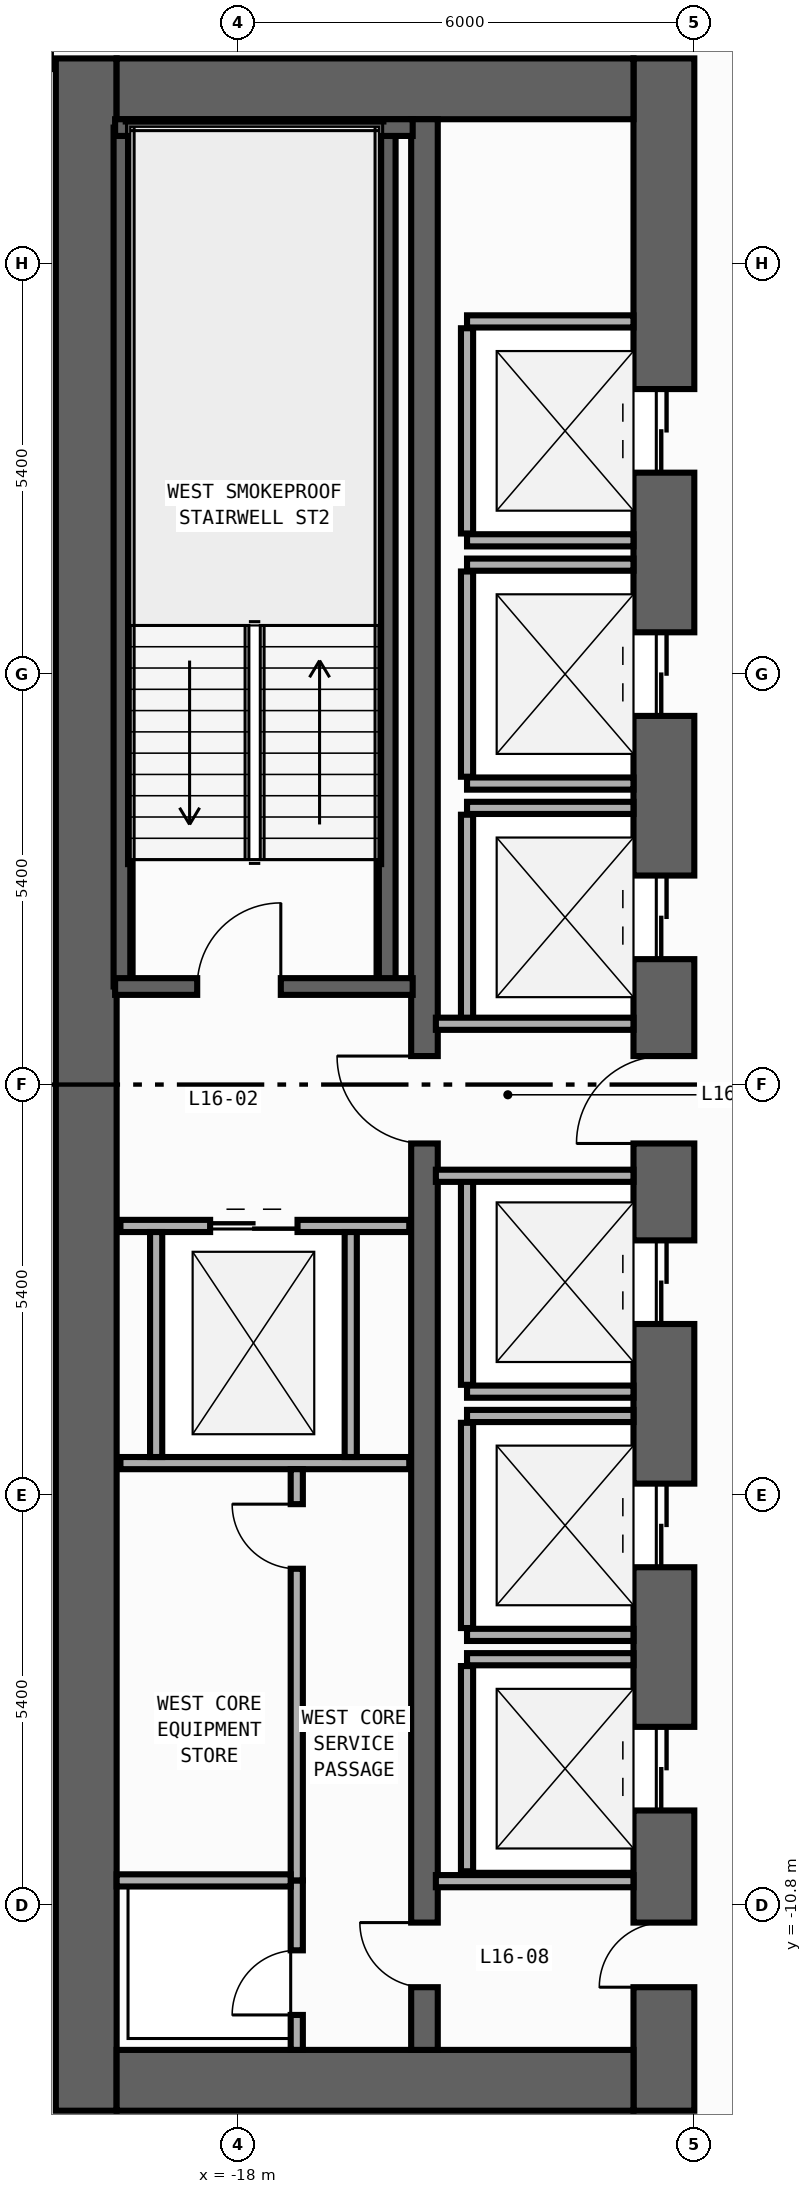
"""IFC4 building model, lengths in metres.
Left out: names, types, materials, properties, quantities, classifications, styles, units other than length and angle.
Written with IfcOpenShell. Run it as: python <this file> out.ifc"""

import sys

from ifc_helpers import new_model, si_unit, direction, frame, frame_2d, origin, place, context, subcontext, project, spatial, rectangle, extrude, element, fill, save


model = new_model("IFC4")
c1 = context("Model", 3, precision=1e-05, world=origin(), true_north=direction((0.0, 1.0)))
c2 = subcontext(c1, "Body", "Model", "MODEL_VIEW")
j1 = project(units=[si_unit("LENGTHUNIT", "METRE"), si_unit("PLANEANGLEUNIT", "RADIAN")], contexts=[c1])
p1 = place(None, origin())
s1 = spatial("IfcSite", under=j1, at=p1, CompositionType="ELEMENT")
p2 = place(p1, origin())
s2 = spatial("IfcBuilding", under=s1, at=p2, CompositionType="ELEMENT")
p3 = place(p2, frame((0.0, 0.0, 68.0)))
s3 = spatial("IfcBuildingStorey", under=s2, at=p3, CompositionType="ELEMENT", Elevation=68.0)
p4 = place(p3, frame((-20.0, -13.5, 0.0), z_axis=(0.0, 0.0, 1.0), x_axis=(0.0, 1.0, 0.0)))
e1 = element("IfcWall", 1, at=p4, inside=s3, PredefinedType="SHEAR", context=c2, shape_type="SweptSolid", body=[
    extrude(rectangle(XDim=27.0, YDim=0.8, at=frame_2d((13.5, 0.0))), origin(), (0.0, 0.0, 1.0), 3.94),
])
p5 = place(p3, frame((-12.4, -13.5, 0.0), z_axis=(0.0, 0.0, 1.0), x_axis=(0.0, 1.0, 0.0)))
e2 = element("IfcWall", 2, at=p5, inside=s3, PredefinedType="SHEAR", context=c2, shape_type="SweptSolid", body=[
    extrude(rectangle(XDim=27.0, YDim=0.8, at=frame_2d((13.5, 0.0))), origin(), (0.0, 0.0, 1.0), 3.94),
])
p6 = place(p5, frame((21.55, 0.0, 0.0)))
e3 = element("IfcOpeningElement", 3, at=p6, cuts=e2, PredefinedType="OPENING", context=c2, shape_type="SweptSolid", body=[
    extrude(rectangle(XDim=1.1, YDim=2.2, at=frame_2d((0.55, 1.1))), frame((0.0, 0.41, 0.0), z_axis=(0.0, -1.0, 0.0), x_axis=(1.0, 0.0, 0.0)), (0.0, 0.0, 1.0), 0.82),
])
p7 = place(p5, frame((18.35, 0.0, 0.0)))
e4 = element("IfcOpeningElement", 4, at=p7, cuts=e2, PredefinedType="OPENING", context=c2, shape_type="SweptSolid", body=[
    extrude(rectangle(XDim=1.1, YDim=2.2, at=frame_2d((0.55, 1.1))), frame((0.0, 0.41, 0.0), z_axis=(0.0, -1.0, 0.0), x_axis=(1.0, 0.0, 0.0)), (0.0, 0.0, 1.0), 0.82),
])
p8 = place(p5, frame((15.15, 0.0, 0.0)))
e5 = element("IfcOpeningElement", 5, at=p8, cuts=e2, PredefinedType="OPENING", context=c2, shape_type="SweptSolid", body=[
    extrude(rectangle(XDim=1.1, YDim=2.2, at=frame_2d((0.55, 1.1))), frame((0.0, 0.41, 0.0), z_axis=(0.0, -1.0, 0.0), x_axis=(1.0, 0.0, 0.0)), (0.0, 0.0, 1.0), 0.82),
])
p9 = place(p5, frame((10.35, 0.0, 0.0)))
e6 = element("IfcOpeningElement", 6, at=p9, cuts=e2, PredefinedType="OPENING", context=c2, shape_type="SweptSolid", body=[
    extrude(rectangle(XDim=1.1, YDim=2.2, at=frame_2d((0.55, 1.1))), frame((0.0, 0.41, 0.0), z_axis=(0.0, -1.0, 0.0), x_axis=(1.0, 0.0, 0.0)), (0.0, 0.0, 1.0), 0.82),
])
p10 = place(p5, frame((7.15, 0.0, 0.0)))
e7 = element("IfcOpeningElement", 7, at=p10, cuts=e2, PredefinedType="OPENING", context=c2, shape_type="SweptSolid", body=[
    extrude(rectangle(XDim=1.1, YDim=2.2, at=frame_2d((0.55, 1.1))), frame((0.0, 0.41, 0.0), z_axis=(0.0, -1.0, 0.0), x_axis=(1.0, 0.0, 0.0)), (0.0, 0.0, 1.0), 0.82),
])
p11 = place(p5, frame((3.95, 0.0, 0.0)))
e8 = element("IfcOpeningElement", 8, at=p11, cuts=e2, PredefinedType="OPENING", context=c2, shape_type="SweptSolid", body=[
    extrude(rectangle(XDim=1.1, YDim=2.2, at=frame_2d((0.55, 1.1))), frame((0.0, 0.41, 0.0), z_axis=(0.0, -1.0, 0.0), x_axis=(1.0, 0.0, 0.0)), (0.0, 0.0, 1.0), 0.82),
])
p12 = place(p5, frame((12.725, 0.0, 0.0)))
e9 = element("IfcOpeningElement", 9, at=p12, cuts=e2, PredefinedType="OPENING", context=c2, shape_type="SweptSolid", body=[
    extrude(rectangle(XDim=1.15, YDim=2.2, at=frame_2d((0.575, 1.1))), frame((0.0, 0.41, 0.0), z_axis=(0.0, -1.0, 0.0), x_axis=(1.0, 0.0, 0.0)), (0.0, 0.0, 1.0), 0.82),
])
p13 = place(p5, frame((1.625, 0.0, 0.0)))
e10 = element("IfcOpeningElement", 10, at=p13, cuts=e2, PredefinedType="OPENING", context=c2, shape_type="SweptSolid", body=[
    extrude(rectangle(XDim=0.85, YDim=2.1, at=frame_2d((0.425, 1.05))), frame((0.0, 0.41, 0.0), z_axis=(0.0, -1.0, 0.0), x_axis=(1.0, 0.0, 0.0)), (0.0, 0.0, 1.0), 0.82),
])
for number, where, z_axis, x_axis in (
    (11, (-19.6, -13.1, 0.0), (0.0, 0.0, 1.0), (1.0, 0.0, 0.0)),
    (12, (-19.6, 13.1, 0.0), (0.0, 0.0, 1.0), (1.0, 0.0, 0.0)),
):
    element("IfcWall", number, at=place(p3, frame(where, z_axis=z_axis, x_axis=x_axis)), inside=s3, PredefinedType="SHEAR", context=c2, shape_type="SweptSolid", body=[
        extrude(rectangle(XDim=6.8, YDim=0.8, at=frame_2d((3.4, 0.0))), origin(), (0.0, 0.0, 1.0), 3.94),
    ])
p14 = place(p3, frame((-15.55, -12.7, 0.0), z_axis=(0.0, 0.0, 1.0), x_axis=(0.0, 1.0, 0.0)))
e13 = element("IfcWall", 13, at=p14, inside=s3, PredefinedType="SHEAR", context=c2, shape_type="SweptSolid", body=[
    extrude(rectangle(XDim=25.4, YDim=0.35, at=frame_2d((12.7, 0.0))), origin(), (0.0, 0.0, 1.0), 3.94),
])
p15 = place(p14, frame((11.925, 0.0, 0.0)))
e14 = element("IfcOpeningElement", 14, at=p15, cuts=e13, PredefinedType="OPENING", context=c2, shape_type="SweptSolid", body=[
    extrude(rectangle(XDim=1.15, YDim=2.2, at=frame_2d((0.575, 1.1))), frame((0.0, 0.185, 0.0), z_axis=(0.0, -1.0, 0.0), x_axis=(1.0, 0.0, 0.0)), (0.0, 0.0, 1.0), 0.37),
])
p16 = place(p14, frame((0.825, 0.0, 0.0)))
e15 = element("IfcOpeningElement", 15, at=p16, cuts=e13, PredefinedType="OPENING", context=c2, shape_type="SweptSolid", body=[
    extrude(rectangle(XDim=0.85, YDim=2.1, at=frame_2d((0.425, 1.05))), frame((0.0, 0.185, 0.0), z_axis=(0.0, -1.0, 0.0), x_axis=(1.0, 0.0, 0.0)), (0.0, 0.0, 1.0), 0.37),
])
for number, where, z_axis, x_axis in (
    (16, (-16.04, 1.29, 0.0), (0.0, 0.0, 1.0), (0.0, 1.0, 0.0)),
    (17, (-19.53, 1.29, 0.0), (0.0, 0.0, 1.0), (0.0, 1.0, 0.0)),
):
    element("IfcWall", number, at=place(p3, frame(where, z_axis=z_axis, x_axis=x_axis)), inside=s3, PredefinedType="SHEAR", context=c2, shape_type="SweptSolid", body=[
        extrude(rectangle(XDim=11.3, YDim=0.22, at=frame_2d((5.65, 0.0))), origin(), (0.0, 0.0, 1.0), 3.94),
    ])
p17 = place(p3, frame((-19.62, 12.59, 0.0), z_axis=(0.0, 0.0, 1.0), x_axis=(1.0, 0.0, 0.0)))
e18 = element("IfcWall", 18, at=p17, inside=s3, PredefinedType="SHEAR", context=c2, shape_type="SweptSolid", body=[
    extrude(rectangle(XDim=3.915, YDim=0.22, at=frame_2d((1.958, 0.0))), origin(), (0.0, 0.0, 1.0), 3.94),
])
p18 = place(p3, frame((-19.62, 1.29, 0.0), z_axis=(0.0, 0.0, 1.0), x_axis=(1.0, 0.0, 0.0)))
e19 = element("IfcWall", 19, at=p18, inside=s3, PredefinedType="SHEAR", context=c2, shape_type="SweptSolid", body=[
    extrude(rectangle(XDim=3.915, YDim=0.22, at=frame_2d((1.958, 0.0))), origin(), (0.0, 0.0, 1.0), 3.94),
])
p19 = place(p18, frame((1.08, 0.0, 0.0)))
e20 = element("IfcOpeningElement", 20, at=p19, cuts=e19, PredefinedType="OPENING", context=c2, shape_type="SweptSolid", body=[
    extrude(rectangle(XDim=1.1, YDim=2.2, at=frame_2d((0.55, 1.1))), frame((0.0, 0.12, 0.0), z_axis=(0.0, -1.0, 0.0), x_axis=(1.0, 0.0, 0.0)), (0.0, 0.0, 1.0), 0.24),
])
for number, where, z_axis, x_axis in (
    (21, (-14.99, 7.16, 0.0), (0.0, 0.0, 1.0), (1.0, 0.0, 0.0)),
    (22, (-14.99, 10.04, 0.0), (0.0, 0.0, 1.0), (1.0, 0.0, 0.0)),
):
    element("IfcWall", number, at=place(p3, frame(where, z_axis=z_axis, x_axis=x_axis)), inside=s3, PredefinedType="STANDARD", context=c2, shape_type="SweptSolid", body=[
        extrude(rectangle(XDim=2.19, YDim=0.16, at=frame_2d((1.095, 0.0))), origin(), (0.0, 0.0, 1.0), 3.94),
    ])
p20 = place(p3, frame((-14.99, 7.25, 0.0), z_axis=(0.0, 0.0, 1.0), x_axis=(0.0, 1.0, 0.0)))
e23 = element("IfcWall", 23, at=p20, inside=s3, PredefinedType="STANDARD", context=c2, shape_type="SweptSolid", body=[
    extrude(rectangle(XDim=2.7, YDim=0.16, at=frame_2d((1.35, 0.0))), origin(), (0.0, 0.0, 1.0), 3.94),
])
for number, where, z_axis, x_axis in (
    (24, (-14.99, 3.96, 0.0), (0.0, 0.0, 1.0), (1.0, 0.0, 0.0)),
    (25, (-14.99, 6.84, 0.0), (0.0, 0.0, 1.0), (1.0, 0.0, 0.0)),
):
    element("IfcWall", number, at=place(p3, frame(where, z_axis=z_axis, x_axis=x_axis)), inside=s3, PredefinedType="STANDARD", context=c2, shape_type="SweptSolid", body=[
        extrude(rectangle(XDim=2.19, YDim=0.16, at=frame_2d((1.095, 0.0))), origin(), (0.0, 0.0, 1.0), 3.94),
    ])
p21 = place(p3, frame((-14.99, 4.05, 0.0), z_axis=(0.0, 0.0, 1.0), x_axis=(0.0, 1.0, 0.0)))
e26 = element("IfcWall", 26, at=p21, inside=s3, PredefinedType="STANDARD", context=c2, shape_type="SweptSolid", body=[
    extrude(rectangle(XDim=2.7, YDim=0.16, at=frame_2d((1.35, 0.0))), origin(), (0.0, 0.0, 1.0), 3.94),
])
p22 = place(p3, frame((-14.99, 3.64, 0.0), z_axis=(0.0, 0.0, 1.0), x_axis=(1.0, 0.0, 0.0)))
e27 = element("IfcWall", 27, at=p22, inside=s3, PredefinedType="STANDARD", context=c2, shape_type="SweptSolid", body=[
    extrude(rectangle(XDim=2.19, YDim=0.16, at=frame_2d((1.095, 0.0))), origin(), (0.0, 0.0, 1.0), 3.94),
])
p23 = place(p3, frame((-14.99, 0.85, 0.0), z_axis=(0.0, 0.0, 1.0), x_axis=(0.0, 1.0, 0.0)))
e28 = element("IfcWall", 28, at=p23, inside=s3, PredefinedType="STANDARD", context=c2, shape_type="SweptSolid", body=[
    extrude(rectangle(XDim=2.7, YDim=0.16, at=frame_2d((1.35, 0.0))), origin(), (0.0, 0.0, 1.0), 3.94),
])
p24 = place(p3, frame((-14.99, -4.04, 0.0), z_axis=(0.0, 0.0, 1.0), x_axis=(1.0, 0.0, 0.0)))
e29 = element("IfcWall", 29, at=p24, inside=s3, PredefinedType="STANDARD", context=c2, shape_type="SweptSolid", body=[
    extrude(rectangle(XDim=2.19, YDim=0.16, at=frame_2d((1.095, 0.0))), origin(), (0.0, 0.0, 1.0), 3.94),
])
p25 = place(p3, frame((-14.99, -3.95, 0.0), z_axis=(0.0, 0.0, 1.0), x_axis=(0.0, 1.0, 0.0)))
e30 = element("IfcWall", 30, at=p25, inside=s3, PredefinedType="STANDARD", context=c2, shape_type="SweptSolid", body=[
    extrude(rectangle(XDim=2.7, YDim=0.16, at=frame_2d((1.35, 0.0))), origin(), (0.0, 0.0, 1.0), 3.94),
])
for number, where, z_axis, x_axis in (
    (31, (-14.99, -7.24, 0.0), (0.0, 0.0, 1.0), (1.0, 0.0, 0.0)),
    (32, (-14.99, -4.36, 0.0), (0.0, 0.0, 1.0), (1.0, 0.0, 0.0)),
):
    element("IfcWall", number, at=place(p3, frame(where, z_axis=z_axis, x_axis=x_axis)), inside=s3, PredefinedType="STANDARD", context=c2, shape_type="SweptSolid", body=[
        extrude(rectangle(XDim=2.19, YDim=0.16, at=frame_2d((1.095, 0.0))), origin(), (0.0, 0.0, 1.0), 3.94),
    ])
p26 = place(p3, frame((-14.99, -7.15, 0.0), z_axis=(0.0, 0.0, 1.0), x_axis=(0.0, 1.0, 0.0)))
e33 = element("IfcWall", 33, at=p26, inside=s3, PredefinedType="STANDARD", context=c2, shape_type="SweptSolid", body=[
    extrude(rectangle(XDim=2.7, YDim=0.16, at=frame_2d((1.35, 0.0))), origin(), (0.0, 0.0, 1.0), 3.94),
])
p27 = place(p3, frame((-14.99, -7.56, 0.0), z_axis=(0.0, 0.0, 1.0), x_axis=(1.0, 0.0, 0.0)))
e34 = element("IfcWall", 34, at=p27, inside=s3, PredefinedType="STANDARD", context=c2, shape_type="SweptSolid", body=[
    extrude(rectangle(XDim=2.19, YDim=0.16, at=frame_2d((1.095, 0.0))), origin(), (0.0, 0.0, 1.0), 3.94),
])
p28 = place(p3, frame((-14.99, -10.35, 0.0), z_axis=(0.0, 0.0, 1.0), x_axis=(0.0, 1.0, 0.0)))
e35 = element("IfcWall", 35, at=p28, inside=s3, PredefinedType="STANDARD", context=c2, shape_type="SweptSolid", body=[
    extrude(rectangle(XDim=2.7, YDim=0.16, at=frame_2d((1.35, 0.0))), origin(), (0.0, 0.0, 1.0), 3.94),
])
p29 = place(p3, frame((-19.55, -1.86, 0.0), z_axis=(0.0, 0.0, 1.0), x_axis=(1.0, 0.0, 0.0)))
e36 = element("IfcWall", 36, at=p29, inside=s3, PredefinedType="STANDARD", context=c2, shape_type="SweptSolid", body=[
    extrude(rectangle(XDim=3.8, YDim=0.16, at=frame_2d((1.9, 0.0))), origin(), (0.0, 0.0, 1.0), 3.94),
])
p30 = place(p29, frame((1.18, 0.0, 0.0)))
e37 = element("IfcOpeningElement", 37, at=p30, cuts=e36, PredefinedType="OPENING", context=c2, shape_type="SweptSolid", body=[
    extrude(rectangle(XDim=1.15, YDim=2.2, at=frame_2d((0.575, 1.1))), frame((0.0, 0.09, 0.0), z_axis=(0.0, -1.0, 0.0), x_axis=(1.0, 0.0, 0.0)), (0.0, 0.0, 1.0), 0.18),
])
p31 = place(p3, frame((-19.55, -4.98, 0.0), z_axis=(0.0, 0.0, 1.0), x_axis=(1.0, 0.0, 0.0)))
e38 = element("IfcWall", 38, at=p31, inside=s3, PredefinedType="STANDARD", context=c2, shape_type="SweptSolid", body=[
    extrude(rectangle(XDim=3.8, YDim=0.16, at=frame_2d((1.9, 0.0))), origin(), (0.0, 0.0, 1.0), 3.94),
])
for number, where, z_axis, x_axis in (
    (39, (-19.08, -4.9, 0.0), (0.0, 0.0, 1.0), (0.0, 1.0, 0.0)),
    (40, (-16.52, -4.9, 0.0), (0.0, 0.0, 1.0), (0.0, 1.0, 0.0)),
):
    element("IfcWall", number, at=place(p3, frame(where, z_axis=z_axis, x_axis=x_axis)), inside=s3, PredefinedType="STANDARD", context=c2, shape_type="SweptSolid", body=[
        extrude(rectangle(XDim=2.96, YDim=0.16, at=frame_2d((1.48, 0.0))), origin(), (0.0, 0.0, 1.0), 3.94),
    ])
for number, where, z_axis, x_axis in (
    (41, (-15.4, 0.8, 0.0), (0.0, 0.0, 1.0), (1.0, 0.0, 0.0)),
    (42, (-15.4, -1.2, 0.0), (0.0, 0.0, 1.0), (1.0, 0.0, 0.0)),
    (43, (-15.4, -10.48, 0.0), (0.0, 0.0, 1.0), (1.0, 0.0, 0.0)),
):
    element("IfcWall", number, at=place(p3, frame(where, z_axis=z_axis, x_axis=x_axis)), inside=s3, PredefinedType="STANDARD", context=c2, shape_type="SweptSolid", body=[
        extrude(rectangle(XDim=2.6, YDim=0.16, at=frame_2d((1.3, 0.0))), origin(), (0.0, 0.0, 1.0), 3.94),
    ])
p32 = place(p3, frame((-17.23, -12.7, 0.0), z_axis=(0.0, 0.0, 1.0), x_axis=(0.0, 1.0, 0.0)))
e44 = element("IfcWall", 44, at=p32, inside=s3, PredefinedType="PARTITIONING", context=c2, shape_type="SweptSolid", body=[
    extrude(rectangle(XDim=2.23, YDim=0.16, at=frame_2d((1.115, 0.0))), origin(), (0.0, 0.0, 1.0), 3.94),
])
p33 = place(p32, frame((0.46, 0.0, 0.0)))
e45 = element("IfcOpeningElement", 45, at=p33, cuts=e44, PredefinedType="OPENING", context=c2, shape_type="SweptSolid", body=[
    extrude(rectangle(XDim=0.85, YDim=2.1, at=frame_2d((0.425, 1.05))), frame((0.0, 0.09, 0.0), z_axis=(0.0, -1.0, 0.0), x_axis=(1.0, 0.0, 0.0)), (0.0, 0.0, 1.0), 0.18),
])
p34 = place(p3, frame((-17.23, -10.47, 0.0), z_axis=(0.0, 0.0, 1.0), x_axis=(0.0, 1.0, 0.0)))
e46 = element("IfcWall", 46, at=p34, inside=s3, PredefinedType="PARTITIONING", context=c2, shape_type="SweptSolid", body=[
    extrude(rectangle(XDim=5.41, YDim=0.16, at=frame_2d((2.705, 0.0))), origin(), (0.0, 0.0, 1.0), 3.94),
])
p35 = place(p34, frame((4.1, 0.0, 0.0)))
e47 = element("IfcOpeningElement", 47, at=p35, cuts=e46, PredefinedType="OPENING", context=c2, shape_type="SweptSolid", body=[
    extrude(rectangle(XDim=0.85, YDim=2.1, at=frame_2d((0.425, 1.05))), frame((0.0, 0.09, 0.0), z_axis=(0.0, -1.0, 0.0), x_axis=(1.0, 0.0, 0.0)), (0.0, 0.0, 1.0), 0.18),
])
p36 = place(p3, frame((-19.6, -10.47, 0.0), z_axis=(0.0, 0.0, 1.0), x_axis=(1.0, 0.0, 0.0)))
e48 = element("IfcWall", 48, at=p36, inside=s3, PredefinedType="PARTITIONING", context=c2, shape_type="SweptSolid", body=[
    extrude(rectangle(XDim=2.29, YDim=0.16, at=frame_2d((1.145, 0.0))), origin(), (0.0, 0.0, 1.0), 3.94),
])
p37 = place(p19, origin())
e49 = element("IfcDoor", 49, at=p37, inside=s3, OperationType="SINGLE_SWING_RIGHT", PredefinedType="DOOR", context=c2, shape_type="SweptSolid", body=[
    extrude(rectangle(XDim=1.1, YDim=2.2, at=frame_2d((0.55, 1.1))), frame((0.0, 0.025, 0.0), z_axis=(0.0, -1.0, 0.0), x_axis=(1.0, 0.0, 0.0)), (0.0, 0.0, 1.0), 0.05),
])
fill(e20, e49)
p38 = place(p6, origin())
e50 = element("IfcDoor", 50, at=p38, inside=s3, OperationType="DOUBLE_DOOR_SLIDING", PredefinedType="DOOR", context=c2, shape_type="SweptSolid", body=[
    extrude(rectangle(XDim=1.1, YDim=2.2, at=frame_2d((0.55, 1.1))), frame((0.0, 0.025, 0.0), z_axis=(0.0, -1.0, 0.0), x_axis=(1.0, 0.0, 0.0)), (0.0, 0.0, 1.0), 0.05),
])
fill(e3, e50)
p39 = place(p7, origin())
e51 = element("IfcDoor", 51, at=p39, inside=s3, OperationType="DOUBLE_DOOR_SLIDING", PredefinedType="DOOR", context=c2, shape_type="SweptSolid", body=[
    extrude(rectangle(XDim=1.1, YDim=2.2, at=frame_2d((0.55, 1.1))), frame((0.0, 0.025, 0.0), z_axis=(0.0, -1.0, 0.0), x_axis=(1.0, 0.0, 0.0)), (0.0, 0.0, 1.0), 0.05),
])
fill(e4, e51)
p40 = place(p8, origin())
e52 = element("IfcDoor", 52, at=p40, inside=s3, OperationType="DOUBLE_DOOR_SLIDING", PredefinedType="DOOR", context=c2, shape_type="SweptSolid", body=[
    extrude(rectangle(XDim=1.1, YDim=2.2, at=frame_2d((0.55, 1.1))), frame((0.0, 0.025, 0.0), z_axis=(0.0, -1.0, 0.0), x_axis=(1.0, 0.0, 0.0)), (0.0, 0.0, 1.0), 0.05),
])
fill(e5, e52)
p41 = place(p9, origin())
e53 = element("IfcDoor", 53, at=p41, inside=s3, OperationType="DOUBLE_DOOR_SLIDING", PredefinedType="DOOR", context=c2, shape_type="SweptSolid", body=[
    extrude(rectangle(XDim=1.1, YDim=2.2, at=frame_2d((0.55, 1.1))), frame((0.0, 0.025, 0.0), z_axis=(0.0, -1.0, 0.0), x_axis=(1.0, 0.0, 0.0)), (0.0, 0.0, 1.0), 0.05),
])
fill(e6, e53)
p42 = place(p10, origin())
e54 = element("IfcDoor", 54, at=p42, inside=s3, OperationType="DOUBLE_DOOR_SLIDING", PredefinedType="DOOR", context=c2, shape_type="SweptSolid", body=[
    extrude(rectangle(XDim=1.1, YDim=2.2, at=frame_2d((0.55, 1.1))), frame((0.0, 0.025, 0.0), z_axis=(0.0, -1.0, 0.0), x_axis=(1.0, 0.0, 0.0)), (0.0, 0.0, 1.0), 0.05),
])
fill(e7, e54)
p43 = place(p11, origin())
e55 = element("IfcDoor", 55, at=p43, inside=s3, OperationType="DOUBLE_DOOR_SLIDING", PredefinedType="DOOR", context=c2, shape_type="SweptSolid", body=[
    extrude(rectangle(XDim=1.1, YDim=2.2, at=frame_2d((0.55, 1.1))), frame((0.0, 0.025, 0.0), z_axis=(0.0, -1.0, 0.0), x_axis=(1.0, 0.0, 0.0)), (0.0, 0.0, 1.0), 0.05),
])
fill(e8, e55)
p44 = place(p12, origin())
e56 = element("IfcDoor", 56, at=p44, inside=s3, OperationType="SINGLE_SWING_LEFT", PredefinedType="DOOR", context=c2, shape_type="SweptSolid", body=[
    extrude(rectangle(XDim=1.15, YDim=2.2, at=frame_2d((0.575, 1.1))), frame((0.0, 0.025, 0.0), z_axis=(0.0, -1.0, 0.0), x_axis=(1.0, 0.0, 0.0)), (0.0, 0.0, 1.0), 0.05),
])
fill(e9, e56)
p45 = place(p15, origin())
e57 = element("IfcDoor", 57, at=p45, inside=s3, OperationType="SINGLE_SWING_RIGHT", PredefinedType="DOOR", context=c2, shape_type="SweptSolid", body=[
    extrude(rectangle(XDim=1.15, YDim=2.2, at=frame_2d((0.575, 1.1))), frame((0.0, 0.025, 0.0), z_axis=(0.0, -1.0, 0.0), x_axis=(1.0, 0.0, 0.0)), (0.0, 0.0, 1.0), 0.05),
])
fill(e14, e57)
p46 = place(p13, origin())
e58 = element("IfcDoor", 58, at=p46, inside=s3, OperationType="SINGLE_SWING_LEFT", PredefinedType="DOOR", context=c2, shape_type="SweptSolid", body=[
    extrude(rectangle(XDim=0.85, YDim=2.1, at=frame_2d((0.425, 1.05))), frame((0.0, 0.025, 0.0), z_axis=(0.0, -1.0, 0.0), x_axis=(1.0, 0.0, 0.0)), (0.0, 0.0, 1.0), 0.05),
])
fill(e10, e58)
p47 = place(p16, origin())
e59 = element("IfcDoor", 59, at=p47, inside=s3, OperationType="SINGLE_SWING_RIGHT", PredefinedType="DOOR", context=c2, shape_type="SweptSolid", body=[
    extrude(rectangle(XDim=0.85, YDim=2.1, at=frame_2d((0.425, 1.05))), frame((0.0, 0.025, 0.0), z_axis=(0.0, -1.0, 0.0), x_axis=(1.0, 0.0, 0.0)), (0.0, 0.0, 1.0), 0.05),
])
fill(e15, e59)
p48 = place(p30, origin())
e60 = element("IfcDoor", 60, at=p48, inside=s3, OperationType="DOUBLE_DOOR_SLIDING", PredefinedType="DOOR", context=c2, shape_type="SweptSolid", body=[
    extrude(rectangle(XDim=1.15, YDim=2.2, at=frame_2d((0.575, 1.1))), frame((0.0, 0.025, 0.0), z_axis=(0.0, -1.0, 0.0), x_axis=(1.0, 0.0, 0.0)), (0.0, 0.0, 1.0), 0.05),
])
fill(e37, e60)
p49 = place(p33, origin())
e61 = element("IfcDoor", 61, at=p49, inside=s3, OperationType="SINGLE_SWING_LEFT", PredefinedType="DOOR", context=c2, shape_type="SweptSolid", body=[
    extrude(rectangle(XDim=0.85, YDim=2.1, at=frame_2d((0.425, 1.05))), frame((0.0, 0.025, 0.0), z_axis=(0.0, -1.0, 0.0), x_axis=(1.0, 0.0, 0.0)), (0.0, 0.0, 1.0), 0.05),
])
fill(e45, e61)
p50 = place(p35, origin())
e62 = element("IfcDoor", 62, at=p50, inside=s3, OperationType="SINGLE_SWING_RIGHT", PredefinedType="DOOR", context=c2, shape_type="SweptSolid", body=[
    extrude(rectangle(XDim=0.85, YDim=2.1, at=frame_2d((0.425, 1.05))), frame((0.0, 0.025, 0.0), z_axis=(0.0, -1.0, 0.0), x_axis=(1.0, 0.0, 0.0)), (0.0, 0.0, 1.0), 0.05),
])
fill(e47, e62)
save(model, sys.argv[1])
